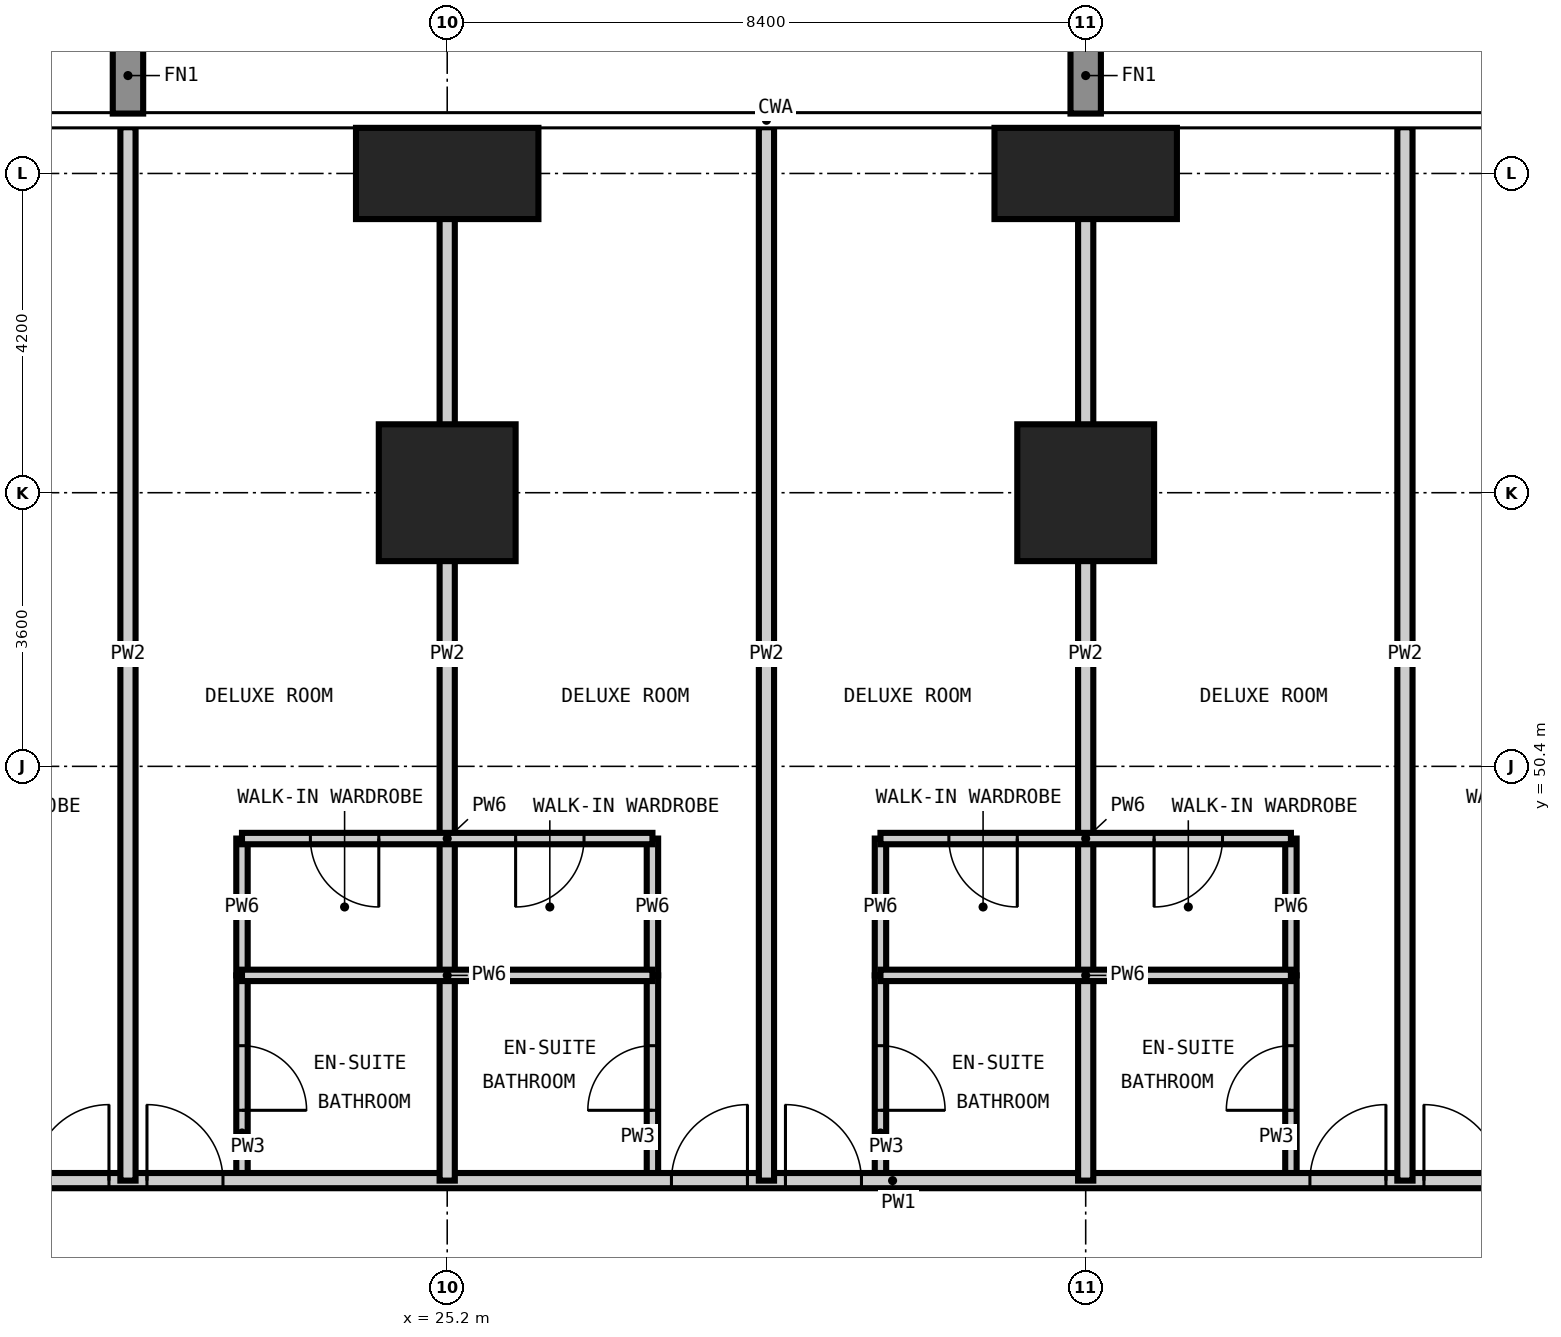
"""IFC4 building model, lengths in metres.
Left out: names, types, materials, properties, quantities, classifications, styles, units other than length and angle.
Written with IfcOpenShell. Run it as: python <this file> out.ifc"""

import sys

from ifc_helpers import new_model, si_unit, direction, frame, frame_2d, origin, origin_2d, place, context, subcontext, project, spatial, rectangle, extrude, element, fill, save


model = new_model("IFC4")
c1 = context("Model", 3, precision=1e-05, world=origin(), true_north=direction((0.0, 1.0)))
c2 = subcontext(c1, "Body", "Model", "MODEL_VIEW")
j1 = project(units=[si_unit("LENGTHUNIT", "METRE"), si_unit("PLANEANGLEUNIT", "RADIAN")], contexts=[c1])
p1 = place(None, origin())
s1 = spatial("IfcSite", under=j1, at=p1, CompositionType="ELEMENT")
p2 = place(p1, origin())
s2 = spatial("IfcBuilding", under=s1, at=p2, CompositionType="ELEMENT")
p3 = place(p2, frame((0.0, 0.0, 63.0)))
s3 = spatial("IfcBuildingStorey", under=s2, at=p3, CompositionType="ELEMENT", Elevation=63.0)
p4 = place(p3, frame((25.2, 54.0, -0.35), z_axis=(0.0, 0.0, 1.0), x_axis=(1.0, 0.0, 0.0)))
e1 = element("IfcColumn", 1, at=p4, inside=s3, PredefinedType="COLUMN", context=c2, shape_type="SweptSolid", body=[
    extrude(rectangle(XDim=1.8, YDim=1.8, at=origin_2d()), origin(), (0.0, 0.0, 1.0), 3.6),
])
p5 = place(p3, frame((25.2, 58.2, -0.35), z_axis=(0.0, 0.0, 1.0), x_axis=(1.0, 0.0, 0.0)))
e2 = element("IfcColumn", 2, at=p5, inside=s3, PredefinedType="COLUMN", context=c2, shape_type="SweptSolid", body=[
    extrude(rectangle(XDim=2.4, YDim=1.2, at=origin_2d()), origin(), (0.0, 0.0, 1.0), 3.6),
])
p6 = place(p3, frame((33.6, 54.0, -0.35), z_axis=(0.0, 0.0, 1.0), x_axis=(1.0, 0.0, 0.0)))
e3 = element("IfcColumn", 3, at=p6, inside=s3, PredefinedType="COLUMN", context=c2, shape_type="SweptSolid", body=[
    extrude(rectangle(XDim=1.8, YDim=1.8, at=origin_2d()), origin(), (0.0, 0.0, 1.0), 3.6),
])
p7 = place(p3, frame((33.6, 58.2, -0.35), z_axis=(0.0, 0.0, 1.0), x_axis=(1.0, 0.0, 0.0)))
e4 = element("IfcColumn", 4, at=p7, inside=s3, PredefinedType="COLUMN", context=c2, shape_type="SweptSolid", body=[
    extrude(rectangle(XDim=2.4, YDim=1.2, at=origin_2d()), origin(), (0.0, 0.0, 1.0), 3.6),
])
p8 = place(p3, frame((22.5, 44.95, 0.0), z_axis=(0.0, 0.0, 1.0), x_axis=(0.0, 1.0, 0.0)))
e5 = element("IfcWall", 5, at=p8, inside=s3, PredefinedType="PARTITIONING", context=c2, shape_type="SweptSolid", body=[
    extrude(rectangle(XDim=2.7, YDim=0.15, at=frame_2d((1.35, 0.0))), origin(), (0.0, 0.0, 1.0), 3.25),
])
p9 = place(p8, frame((0.925, 0.0, 0.0)))
e6 = element("IfcOpeningElement", 6, at=p9, cuts=e5, PredefinedType="OPENING", context=c2, shape_type="SweptSolid", body=[
    extrude(rectangle(XDim=0.85, YDim=2.1, at=frame_2d((0.425, 1.05))), frame((0.0, 0.085, 0.0), z_axis=(0.0, -1.0, 0.0), x_axis=(1.0, 0.0, 0.0)), (0.0, 0.0, 1.0), 0.17),
])
p10 = place(p3, frame((27.9, 44.95, 0.0), z_axis=(0.0, 0.0, 1.0), x_axis=(0.0, 1.0, 0.0)))
e7 = element("IfcWall", 7, at=p10, inside=s3, PredefinedType="PARTITIONING", context=c2, shape_type="SweptSolid", body=[
    extrude(rectangle(XDim=2.7, YDim=0.15, at=frame_2d((1.35, 0.0))), origin(), (0.0, 0.0, 1.0), 3.25),
])
p11 = place(p10, frame((0.925, 0.0, 0.0)))
e8 = element("IfcOpeningElement", 8, at=p11, cuts=e7, PredefinedType="OPENING", context=c2, shape_type="SweptSolid", body=[
    extrude(rectangle(XDim=0.85, YDim=2.1, at=frame_2d((0.425, 1.05))), frame((0.0, 0.085, 0.0), z_axis=(0.0, -1.0, 0.0), x_axis=(1.0, 0.0, 0.0)), (0.0, 0.0, 1.0), 0.17),
])
p12 = place(p3, frame((30.9, 44.95, 0.0), z_axis=(0.0, 0.0, 1.0), x_axis=(0.0, 1.0, 0.0)))
e9 = element("IfcWall", 9, at=p12, inside=s3, PredefinedType="PARTITIONING", context=c2, shape_type="SweptSolid", body=[
    extrude(rectangle(XDim=2.7, YDim=0.15, at=frame_2d((1.35, 0.0))), origin(), (0.0, 0.0, 1.0), 3.25),
])
p13 = place(p12, frame((0.925, 0.0, 0.0)))
e10 = element("IfcOpeningElement", 10, at=p13, cuts=e9, PredefinedType="OPENING", context=c2, shape_type="SweptSolid", body=[
    extrude(rectangle(XDim=0.85, YDim=2.1, at=frame_2d((0.425, 1.05))), frame((0.0, 0.085, 0.0), z_axis=(0.0, -1.0, 0.0), x_axis=(1.0, 0.0, 0.0)), (0.0, 0.0, 1.0), 0.17),
])
p14 = place(p3, frame((36.3, 44.95, 0.0), z_axis=(0.0, 0.0, 1.0), x_axis=(0.0, 1.0, 0.0)))
e11 = element("IfcWall", 11, at=p14, inside=s3, PredefinedType="PARTITIONING", context=c2, shape_type="SweptSolid", body=[
    extrude(rectangle(XDim=2.7, YDim=0.15, at=frame_2d((1.35, 0.0))), origin(), (0.0, 0.0, 1.0), 3.25),
])
p15 = place(p14, frame((0.925, 0.0, 0.0)))
e12 = element("IfcOpeningElement", 12, at=p15, cuts=e11, PredefinedType="OPENING", context=c2, shape_type="SweptSolid", body=[
    extrude(rectangle(XDim=0.85, YDim=2.1, at=frame_2d((0.425, 1.05))), frame((0.0, 0.085, 0.0), z_axis=(0.0, -1.0, 0.0), x_axis=(1.0, 0.0, 0.0)), (0.0, 0.0, 1.0), 0.17),
])
p16 = place(p3, frame((13.25, 44.95, 0.0), z_axis=(0.0, 0.0, 1.0), x_axis=(1.0, 0.0, 0.0)))
e13 = element("IfcWall", 13, at=p16, inside=s3, PredefinedType="PARTITIONING", context=c2, shape_type="SweptSolid", body=[
    extrude(rectangle(XDim=32.9, YDim=0.2, at=frame_2d((16.45, 0.0))), origin(), (0.0, 0.0, 1.0), 3.25),
])
p17 = place(p16, frame((6.5, 0.0, 0.0)))
e14 = element("IfcOpeningElement", 14, at=p17, cuts=e13, PredefinedType="OPENING", context=c2, shape_type="SweptSolid", body=[
    extrude(rectangle(XDim=1.0, YDim=2.2, at=frame_2d((0.5, 1.1))), frame((0.0, 0.11, 0.0), z_axis=(0.0, -1.0, 0.0), x_axis=(1.0, 0.0, 0.0)), (0.0, 0.0, 1.0), 0.22),
])
p18 = place(p16, frame((8.0, 0.0, 0.0)))
e15 = element("IfcOpeningElement", 15, at=p18, cuts=e13, PredefinedType="OPENING", context=c2, shape_type="SweptSolid", body=[
    extrude(rectangle(XDim=1.0, YDim=2.2, at=frame_2d((0.5, 1.1))), frame((0.0, 0.11, 0.0), z_axis=(0.0, -1.0, 0.0), x_axis=(1.0, 0.0, 0.0)), (0.0, 0.0, 1.0), 0.22),
])
p19 = place(p16, frame((14.9, 0.0, 0.0)))
e16 = element("IfcOpeningElement", 16, at=p19, cuts=e13, PredefinedType="OPENING", context=c2, shape_type="SweptSolid", body=[
    extrude(rectangle(XDim=1.0, YDim=2.2, at=frame_2d((0.5, 1.1))), frame((0.0, 0.11, 0.0), z_axis=(0.0, -1.0, 0.0), x_axis=(1.0, 0.0, 0.0)), (0.0, 0.0, 1.0), 0.22),
])
p20 = place(p16, frame((16.4, 0.0, 0.0)))
e17 = element("IfcOpeningElement", 17, at=p20, cuts=e13, PredefinedType="OPENING", context=c2, shape_type="SweptSolid", body=[
    extrude(rectangle(XDim=1.0, YDim=2.2, at=frame_2d((0.5, 1.1))), frame((0.0, 0.11, 0.0), z_axis=(0.0, -1.0, 0.0), x_axis=(1.0, 0.0, 0.0)), (0.0, 0.0, 1.0), 0.22),
])
p21 = place(p16, frame((23.3, 0.0, 0.0)))
e18 = element("IfcOpeningElement", 18, at=p21, cuts=e13, PredefinedType="OPENING", context=c2, shape_type="SweptSolid", body=[
    extrude(rectangle(XDim=1.0, YDim=2.2, at=frame_2d((0.5, 1.1))), frame((0.0, 0.11, 0.0), z_axis=(0.0, -1.0, 0.0), x_axis=(1.0, 0.0, 0.0)), (0.0, 0.0, 1.0), 0.22),
])
p22 = place(p16, frame((24.8, 0.0, 0.0)))
e19 = element("IfcOpeningElement", 19, at=p22, cuts=e13, PredefinedType="OPENING", context=c2, shape_type="SweptSolid", body=[
    extrude(rectangle(XDim=1.0, YDim=2.2, at=frame_2d((0.5, 1.1))), frame((0.0, 0.11, 0.0), z_axis=(0.0, -1.0, 0.0), x_axis=(1.0, 0.0, 0.0)), (0.0, 0.0, 1.0), 0.22),
])
for number, where, z_axis, x_axis in (
    (20, (21.0, 44.95, 0.0), (0.0, 0.0, 1.0), (0.0, 1.0, 0.0)),
    (21, (25.2, 44.95, 0.0), (0.0, 0.0, 1.0), (0.0, 1.0, 0.0)),
    (22, (29.4, 44.95, 0.0), (0.0, 0.0, 1.0), (0.0, 1.0, 0.0)),
    (23, (33.6, 44.95, 0.0), (0.0, 0.0, 1.0), (0.0, 1.0, 0.0)),
    (24, (37.8, 44.95, 0.0), (0.0, 0.0, 1.0), (0.0, 1.0, 0.0)),
):
    element("IfcWall", number, at=place(p3, frame(where, z_axis=z_axis, x_axis=x_axis)), inside=s3, PredefinedType="PARTITIONING", context=c2, shape_type="SweptSolid", body=[
        extrude(rectangle(XDim=13.858, YDim=0.2, at=frame_2d((6.929, 0.0))), origin(), (0.0, 0.0, 1.0), 3.25),
    ])
for number, where, z_axis, x_axis in (
    (25, (22.5, 47.65, 0.0), (0.0, 0.0, 1.0), (0.0, 1.0, 0.0)),
    (26, (27.9, 47.65, 0.0), (0.0, 0.0, 1.0), (0.0, 1.0, 0.0)),
    (27, (30.9, 47.65, 0.0), (0.0, 0.0, 1.0), (0.0, 1.0, 0.0)),
    (28, (36.3, 47.65, 0.0), (0.0, 0.0, 1.0), (0.0, 1.0, 0.0)),
):
    element("IfcWall", number, at=place(p3, frame(where, z_axis=z_axis, x_axis=x_axis)), inside=s3, PredefinedType="PARTITIONING", context=c2, shape_type="SweptSolid", body=[
        extrude(rectangle(XDim=1.8, YDim=0.15, at=frame_2d((0.9, 0.0))), origin(), (0.0, 0.0, 1.0), 3.25),
    ])
p23 = place(p3, frame((22.5, 47.65, 0.0), z_axis=(0.0, 0.0, 1.0), x_axis=(1.0, 0.0, 0.0)))
e29 = element("IfcWall", 29, at=p23, inside=s3, PredefinedType="PARTITIONING", context=c2, shape_type="SweptSolid", body=[
    extrude(rectangle(XDim=5.4, YDim=0.15, at=frame_2d((2.7, 0.0))), origin(), (0.0, 0.0, 1.0), 3.25),
])
p24 = place(p3, frame((30.9, 47.65, 0.0), z_axis=(0.0, 0.0, 1.0), x_axis=(1.0, 0.0, 0.0)))
e30 = element("IfcWall", 30, at=p24, inside=s3, PredefinedType="PARTITIONING", context=c2, shape_type="SweptSolid", body=[
    extrude(rectangle(XDim=5.4, YDim=0.15, at=frame_2d((2.7, 0.0))), origin(), (0.0, 0.0, 1.0), 3.25),
])
p25 = place(p3, frame((22.5, 49.45, 0.0), z_axis=(0.0, 0.0, 1.0), x_axis=(1.0, 0.0, 0.0)))
e31 = element("IfcWall", 31, at=p25, inside=s3, PredefinedType="PARTITIONING", context=c2, shape_type="SweptSolid", body=[
    extrude(rectangle(XDim=5.4, YDim=0.15, at=frame_2d((2.7, 0.0))), origin(), (0.0, 0.0, 1.0), 3.25),
])
p26 = place(p25, frame((0.9, 0.0, 0.0)))
e32 = element("IfcOpeningElement", 32, at=p26, cuts=e31, PredefinedType="OPENING", context=c2, shape_type="SweptSolid", body=[
    extrude(rectangle(XDim=0.9, YDim=2.1, at=frame_2d((0.45, 1.05))), frame((0.0, 0.085, 0.0), z_axis=(0.0, -1.0, 0.0), x_axis=(1.0, 0.0, 0.0)), (0.0, 0.0, 1.0), 0.17),
])
p27 = place(p25, frame((3.6, 0.0, 0.0)))
e33 = element("IfcOpeningElement", 33, at=p27, cuts=e31, PredefinedType="OPENING", context=c2, shape_type="SweptSolid", body=[
    extrude(rectangle(XDim=0.9, YDim=2.1, at=frame_2d((0.45, 1.05))), frame((0.0, 0.085, 0.0), z_axis=(0.0, -1.0, 0.0), x_axis=(1.0, 0.0, 0.0)), (0.0, 0.0, 1.0), 0.17),
])
p28 = place(p3, frame((30.9, 49.45, 0.0), z_axis=(0.0, 0.0, 1.0), x_axis=(1.0, 0.0, 0.0)))
e34 = element("IfcWall", 34, at=p28, inside=s3, PredefinedType="PARTITIONING", context=c2, shape_type="SweptSolid", body=[
    extrude(rectangle(XDim=5.4, YDim=0.15, at=frame_2d((2.7, 0.0))), origin(), (0.0, 0.0, 1.0), 3.25),
])
p29 = place(p28, frame((0.9, 0.0, 0.0)))
e35 = element("IfcOpeningElement", 35, at=p29, cuts=e34, PredefinedType="OPENING", context=c2, shape_type="SweptSolid", body=[
    extrude(rectangle(XDim=0.9, YDim=2.1, at=frame_2d((0.45, 1.05))), frame((0.0, 0.085, 0.0), z_axis=(0.0, -1.0, 0.0), x_axis=(1.0, 0.0, 0.0)), (0.0, 0.0, 1.0), 0.17),
])
p30 = place(p28, frame((3.6, 0.0, 0.0)))
e36 = element("IfcOpeningElement", 36, at=p30, cuts=e34, PredefinedType="OPENING", context=c2, shape_type="SweptSolid", body=[
    extrude(rectangle(XDim=0.9, YDim=2.1, at=frame_2d((0.45, 1.05))), frame((0.0, 0.085, 0.0), z_axis=(0.0, -1.0, 0.0), x_axis=(1.0, 0.0, 0.0)), (0.0, 0.0, 1.0), 0.17),
])
p31 = place(p17, origin())
e37 = element("IfcDoor", 37, at=p31, inside=s3, OperationType="SINGLE_SWING_RIGHT", PredefinedType="DOOR", context=c2, shape_type="SweptSolid", body=[
    extrude(rectangle(XDim=1.0, YDim=2.2, at=frame_2d((0.5, 1.1))), frame((0.0, 0.025, 0.0), z_axis=(0.0, -1.0, 0.0), x_axis=(1.0, 0.0, 0.0)), (0.0, 0.0, 1.0), 0.05),
])
fill(e14, e37)
p32 = place(p18, origin())
e38 = element("IfcDoor", 38, at=p32, inside=s3, OperationType="SINGLE_SWING_LEFT", PredefinedType="DOOR", context=c2, shape_type="SweptSolid", body=[
    extrude(rectangle(XDim=1.0, YDim=2.2, at=frame_2d((0.5, 1.1))), frame((0.0, 0.025, 0.0), z_axis=(0.0, -1.0, 0.0), x_axis=(1.0, 0.0, 0.0)), (0.0, 0.0, 1.0), 0.05),
])
fill(e15, e38)
p33 = place(p9, frame((0.85, 0.0, 0.0), z_axis=(0.0, 0.0, 1.0), x_axis=(-1.0, 0.0, 0.0)))
e39 = element("IfcDoor", 39, at=p33, inside=s3, OperationType="SINGLE_SWING_RIGHT", PredefinedType="DOOR", context=c2, shape_type="SweptSolid", body=[
    extrude(rectangle(XDim=0.85, YDim=2.1, at=frame_2d((0.425, 1.05))), frame((0.0, 0.025, 0.0), z_axis=(0.0, -1.0, 0.0), x_axis=(1.0, 0.0, 0.0)), (0.0, 0.0, 1.0), 0.05),
])
fill(e6, e39)
p34 = place(p26, frame((0.9, 0.0, 0.0), z_axis=(0.0, 0.0, 1.0), x_axis=(-1.0, 0.0, 0.0)))
e40 = element("IfcDoor", 40, at=p34, inside=s3, OperationType="SINGLE_SWING_LEFT", PredefinedType="DOOR", context=c2, shape_type="SweptSolid", body=[
    extrude(rectangle(XDim=0.9, YDim=2.1, at=frame_2d((0.45, 1.05))), frame((0.0, 0.025, 0.0), z_axis=(0.0, -1.0, 0.0), x_axis=(1.0, 0.0, 0.0)), (0.0, 0.0, 1.0), 0.05),
])
fill(e32, e40)
p35 = place(p19, origin())
e41 = element("IfcDoor", 41, at=p35, inside=s3, OperationType="SINGLE_SWING_RIGHT", PredefinedType="DOOR", context=c2, shape_type="SweptSolid", body=[
    extrude(rectangle(XDim=1.0, YDim=2.2, at=frame_2d((0.5, 1.1))), frame((0.0, 0.025, 0.0), z_axis=(0.0, -1.0, 0.0), x_axis=(1.0, 0.0, 0.0)), (0.0, 0.0, 1.0), 0.05),
])
fill(e16, e41)
p36 = place(p11, origin())
e42 = element("IfcDoor", 42, at=p36, inside=s3, OperationType="SINGLE_SWING_LEFT", PredefinedType="DOOR", context=c2, shape_type="SweptSolid", body=[
    extrude(rectangle(XDim=0.85, YDim=2.1, at=frame_2d((0.425, 1.05))), frame((0.0, 0.025, 0.0), z_axis=(0.0, -1.0, 0.0), x_axis=(1.0, 0.0, 0.0)), (0.0, 0.0, 1.0), 0.05),
])
fill(e8, e42)
p37 = place(p27, frame((0.9, 0.0, 0.0), z_axis=(0.0, 0.0, 1.0), x_axis=(-1.0, 0.0, 0.0)))
e43 = element("IfcDoor", 43, at=p37, inside=s3, OperationType="SINGLE_SWING_RIGHT", PredefinedType="DOOR", context=c2, shape_type="SweptSolid", body=[
    extrude(rectangle(XDim=0.9, YDim=2.1, at=frame_2d((0.45, 1.05))), frame((0.0, 0.025, 0.0), z_axis=(0.0, -1.0, 0.0), x_axis=(1.0, 0.0, 0.0)), (0.0, 0.0, 1.0), 0.05),
])
fill(e33, e43)
p38 = place(p20, origin())
e44 = element("IfcDoor", 44, at=p38, inside=s3, OperationType="SINGLE_SWING_LEFT", PredefinedType="DOOR", context=c2, shape_type="SweptSolid", body=[
    extrude(rectangle(XDim=1.0, YDim=2.2, at=frame_2d((0.5, 1.1))), frame((0.0, 0.025, 0.0), z_axis=(0.0, -1.0, 0.0), x_axis=(1.0, 0.0, 0.0)), (0.0, 0.0, 1.0), 0.05),
])
fill(e17, e44)
p39 = place(p13, frame((0.85, 0.0, 0.0), z_axis=(0.0, 0.0, 1.0), x_axis=(-1.0, 0.0, 0.0)))
e45 = element("IfcDoor", 45, at=p39, inside=s3, OperationType="SINGLE_SWING_RIGHT", PredefinedType="DOOR", context=c2, shape_type="SweptSolid", body=[
    extrude(rectangle(XDim=0.85, YDim=2.1, at=frame_2d((0.425, 1.05))), frame((0.0, 0.025, 0.0), z_axis=(0.0, -1.0, 0.0), x_axis=(1.0, 0.0, 0.0)), (0.0, 0.0, 1.0), 0.05),
])
fill(e10, e45)
p40 = place(p29, frame((0.9, 0.0, 0.0), z_axis=(0.0, 0.0, 1.0), x_axis=(-1.0, 0.0, 0.0)))
e46 = element("IfcDoor", 46, at=p40, inside=s3, OperationType="SINGLE_SWING_LEFT", PredefinedType="DOOR", context=c2, shape_type="SweptSolid", body=[
    extrude(rectangle(XDim=0.9, YDim=2.1, at=frame_2d((0.45, 1.05))), frame((0.0, 0.025, 0.0), z_axis=(0.0, -1.0, 0.0), x_axis=(1.0, 0.0, 0.0)), (0.0, 0.0, 1.0), 0.05),
])
fill(e35, e46)
p41 = place(p21, origin())
e47 = element("IfcDoor", 47, at=p41, inside=s3, OperationType="SINGLE_SWING_RIGHT", PredefinedType="DOOR", context=c2, shape_type="SweptSolid", body=[
    extrude(rectangle(XDim=1.0, YDim=2.2, at=frame_2d((0.5, 1.1))), frame((0.0, 0.025, 0.0), z_axis=(0.0, -1.0, 0.0), x_axis=(1.0, 0.0, 0.0)), (0.0, 0.0, 1.0), 0.05),
])
fill(e18, e47)
p42 = place(p15, origin())
e48 = element("IfcDoor", 48, at=p42, inside=s3, OperationType="SINGLE_SWING_LEFT", PredefinedType="DOOR", context=c2, shape_type="SweptSolid", body=[
    extrude(rectangle(XDim=0.85, YDim=2.1, at=frame_2d((0.425, 1.05))), frame((0.0, 0.025, 0.0), z_axis=(0.0, -1.0, 0.0), x_axis=(1.0, 0.0, 0.0)), (0.0, 0.0, 1.0), 0.05),
])
fill(e12, e48)
p43 = place(p30, frame((0.9, 0.0, 0.0), z_axis=(0.0, 0.0, 1.0), x_axis=(-1.0, 0.0, 0.0)))
e49 = element("IfcDoor", 49, at=p43, inside=s3, OperationType="SINGLE_SWING_RIGHT", PredefinedType="DOOR", context=c2, shape_type="SweptSolid", body=[
    extrude(rectangle(XDim=0.9, YDim=2.1, at=frame_2d((0.45, 1.05))), frame((0.0, 0.025, 0.0), z_axis=(0.0, -1.0, 0.0), x_axis=(1.0, 0.0, 0.0)), (0.0, 0.0, 1.0), 0.05),
])
fill(e36, e49)
p44 = place(p22, origin())
e50 = element("IfcDoor", 50, at=p44, inside=s3, OperationType="SINGLE_SWING_LEFT", PredefinedType="DOOR", context=c2, shape_type="SweptSolid", body=[
    extrude(rectangle(XDim=1.0, YDim=2.2, at=frame_2d((0.5, 1.1))), frame((0.0, 0.025, 0.0), z_axis=(0.0, -1.0, 0.0), x_axis=(1.0, 0.0, 0.0)), (0.0, 0.0, 1.0), 0.05),
])
fill(e19, e50)
save(model, sys.argv[1])
